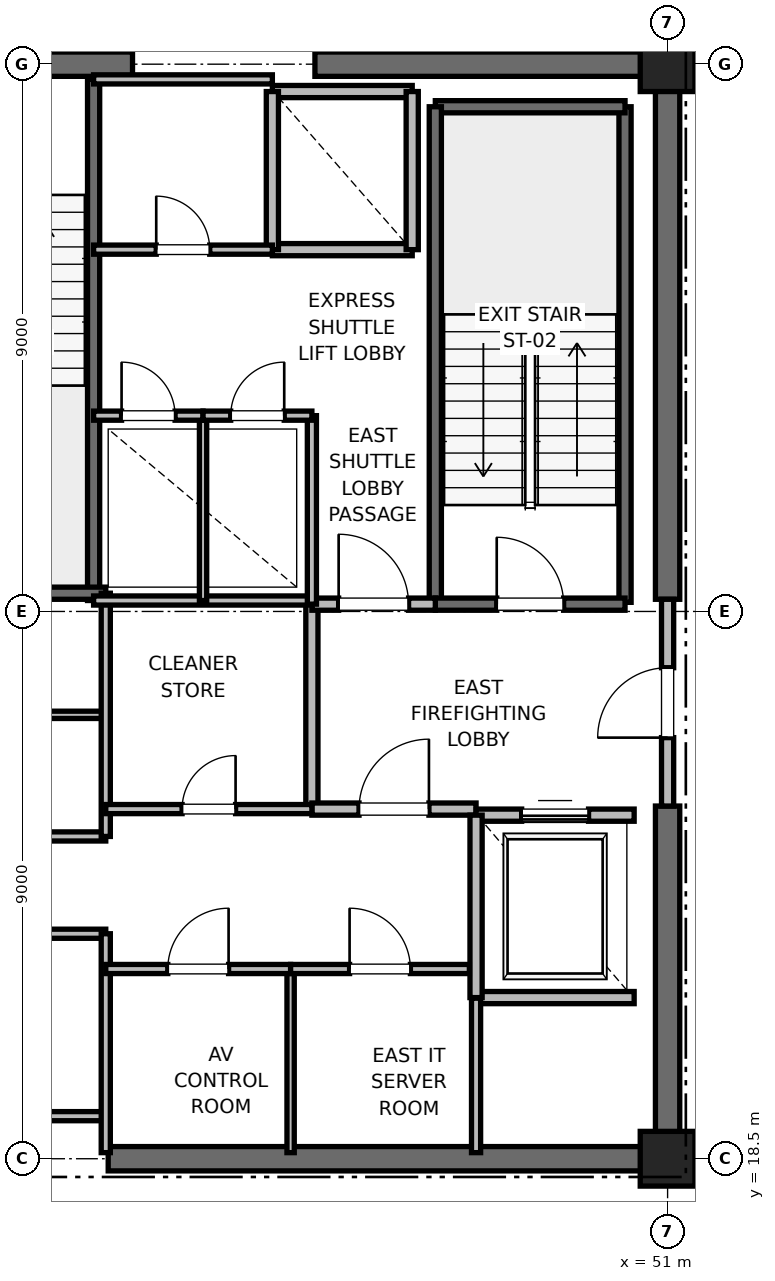
"""IFC4 building model, lengths in metres.
Left out: names, types, materials, properties, quantities, classifications, styles, units other than length and angle.
Written with IfcOpenShell. Run it as: python <this file> out.ifc"""

import sys

from ifc_helpers import new_model, si_unit, direction, frame, frame_2d, origin, origin_2d, place, context, subcontext, project, spatial, rectangle, extrude, element, fill, save


model = new_model("IFC4")
c1 = context("Model", 3, precision=1e-05, world=origin(), true_north=direction((0.0, 1.0)))
c2 = subcontext(c1, "Body", "Model", "MODEL_VIEW")
j1 = project(units=[si_unit("LENGTHUNIT", "METRE"), si_unit("PLANEANGLEUNIT", "RADIAN")], contexts=[c1])
p1 = place(None, origin())
s1 = spatial("IfcSite", under=j1, at=p1, CompositionType="ELEMENT")
p2 = place(p1, origin())
s2 = spatial("IfcBuilding", under=s1, at=p2, CompositionType="ELEMENT")
p3 = place(p2, frame((0.0, 0.0, 314.8)))
s3 = spatial("IfcBuildingStorey", under=s2, at=p3, CompositionType="ELEMENT", Elevation=314.8)
for number, where, z_axis, x_axis in (
    (1, (51.0, 18.5, 0.0), (0.0, 0.0, 1.0), (1.0, 0.0, 0.0)),
    (2, (51.0, 36.5, 0.0), (0.0, 0.0, 1.0), (1.0, 0.0, 0.0)),
):
    element("IfcColumn", number, at=place(p3, frame(where, z_axis=z_axis, x_axis=x_axis)), inside=s3, PredefinedType="PILASTER", context=c2, shape_type="SweptSolid", body=[
        extrude(rectangle(XDim=0.9, YDim=0.9, at=origin_2d()), origin(), (0.0, 0.0, 1.0), 4.0),
    ])
p4 = place(p3, frame((41.8, 18.5, 0.0), z_axis=(0.0, 0.0, 1.0), x_axis=(1.0, 0.0, 0.0)))
e3 = element("IfcWall", 3, at=p4, inside=s3, PredefinedType="SHEAR", context=c2, shape_type="SweptSolid", body=[
    extrude(rectangle(XDim=9.2, YDim=0.4, at=frame_2d((4.6, 0.0))), origin(), (0.0, 0.0, 1.0), 3.785),
])
p5 = place(p3, frame((37.8, 36.5, 0.0), z_axis=(0.0, 0.0, 1.0), x_axis=(1.0, 0.0, 0.0)))
e4 = element("IfcWall", 4, at=p5, inside=s3, PredefinedType="SHEAR", context=c2, shape_type="SweptSolid", body=[
    extrude(rectangle(XDim=4.4, YDim=0.4, at=frame_2d((2.2, 0.0))), origin(), (0.0, 0.0, 1.0), 3.785),
])
p6 = place(p5, frame((1.65, 0.0, 0.0)))
e5 = element("IfcOpeningElement", 5, at=p6, cuts=e4, PredefinedType="OPENING", context=c2, shape_type="SweptSolid", body=[
    extrude(rectangle(XDim=1.1, YDim=2.15, at=frame_2d((0.55, 1.075))), frame((0.0, 0.2, 0.0), z_axis=(0.0, -1.0, 0.0), x_axis=(1.0, 0.0, 0.0)), (0.0, 0.0, 1.0), 0.4),
])
for number, where, z_axis, x_axis in (
    (6, (45.2, 36.5, 0.0), (0.0, 0.0, 1.0), (1.0, 0.0, 0.0)),
    (7, (51.0, 18.5, 0.0), (0.0, 0.0, 1.0), (0.0, 1.0, 0.0)),
):
    element("IfcWall", number, at=place(p3, frame(where, z_axis=z_axis, x_axis=x_axis)), inside=s3, PredefinedType="SHEAR", context=c2, shape_type="SweptSolid", body=[
        extrude(rectangle(XDim=5.8, YDim=0.4, at=frame_2d((2.9, 0.0))), origin(), (0.0, 0.0, 1.0), 3.785),
    ])
p7 = place(p3, frame((51.0, 27.7, 0.0), z_axis=(0.0, 0.0, 1.0), x_axis=(0.0, 1.0, 0.0)))
e8 = element("IfcWall", 8, at=p7, inside=s3, PredefinedType="SHEAR", context=c2, shape_type="SweptSolid", body=[
    extrude(rectangle(XDim=8.8, YDim=0.4, at=frame_2d((4.4, 0.0))), origin(), (0.0, 0.0, 1.0), 3.785),
])
p8 = place(p3, frame((50.3, 27.65, 0.0), z_axis=(0.0, 0.0, 1.0), x_axis=(0.0, 1.0, 0.0)))
e9 = element("IfcWall", 9, at=p8, inside=s3, PredefinedType="SOLIDWALL", context=c2, shape_type="SweptSolid", body=[
    extrude(rectangle(XDim=8.15, YDim=0.2, at=frame_2d((4.075, 0.0))), origin(), (0.0, 0.0, 1.0), 3.785),
])
p9 = place(p3, frame((47.18, 35.8, 0.0), z_axis=(0.0, 0.0, 1.0), x_axis=(1.0, 0.0, 0.0)))
e10 = element("IfcWall", 10, at=p9, inside=s3, PredefinedType="SOLIDWALL", context=c2, shape_type="SweptSolid", body=[
    extrude(rectangle(XDim=3.12, YDim=0.2, at=frame_2d((1.56, 0.0))), origin(), (0.0, 0.0, 1.0), 3.785),
])
p10 = place(p3, frame((47.18, 27.62, 0.0), z_axis=(0.0, 0.0, 1.0), x_axis=(0.0, 1.0, 0.0)))
e11 = element("IfcWall", 11, at=p10, inside=s3, PredefinedType="SOLIDWALL", context=c2, shape_type="SweptSolid", body=[
    extrude(rectangle(XDim=8.18, YDim=0.2, at=frame_2d((4.09, 0.0))), origin(), (0.0, 0.0, 1.0), 3.785),
])
p11 = place(p3, frame((47.18, 27.62, 0.0), z_axis=(0.0, 0.0, 1.0), x_axis=(1.0, 0.0, 0.0)))
e12 = element("IfcWall", 12, at=p11, inside=s3, PredefinedType="SOLIDWALL", context=c2, shape_type="SweptSolid", body=[
    extrude(rectangle(XDim=3.12, YDim=0.2, at=frame_2d((1.56, 0.0))), origin(), (0.0, 0.0, 1.0), 3.785),
])
p12 = place(p11, frame((1.01, 0.0, 0.0)))
e13 = element("IfcOpeningElement", 13, at=p12, cuts=e12, PredefinedType="OPENING", context=c2, shape_type="SweptSolid", body=[
    extrude(rectangle(XDim=1.1, YDim=2.15, at=frame_2d((0.55, 1.075))), frame((0.0, 0.1, 0.0), z_axis=(0.0, -1.0, 0.0), x_axis=(1.0, 0.0, 0.0)), (0.0, 0.0, 1.0), 0.2),
])
p13 = place(p3, frame((41.56, 27.68, 0.0), z_axis=(0.0, 0.0, 1.0), x_axis=(0.0, 1.0, 0.0)))
e14 = element("IfcWall", 14, at=p13, inside=s3, PredefinedType="SOLIDWALL", context=c2, shape_type="SweptSolid", body=[
    extrude(rectangle(XDim=8.57, YDim=0.2, at=frame_2d((4.285, 0.0))), origin(), (0.0, 0.0, 1.0), 3.785),
])
p14 = place(p3, frame((38.44, 27.8, 0.0), z_axis=(0.0, 0.0, 1.0), x_axis=(1.0, 0.0, 0.0)))
e15 = element("IfcWall", 15, at=p14, inside=s3, PredefinedType="SOLIDWALL", context=c2, shape_type="SweptSolid", body=[
    extrude(rectangle(XDim=3.32, YDim=0.2, at=frame_2d((1.66, 0.0))), origin(), (0.0, 0.0, 1.0), 3.785),
])
p15 = place(p3, frame((45.15, 24.25, 0.0), z_axis=(0.0, 0.0, 1.0), x_axis=(0.0, 1.0, 0.0)))
e16 = element("IfcWall", 16, at=p15, inside=s3, PredefinedType="PARTITIONING", context=c2, shape_type="SweptSolid", body=[
    extrude(rectangle(XDim=3.37, YDim=0.2, at=frame_2d((1.685, 0.0))), origin(), (0.0, 0.0, 1.0), 3.785),
])
p16 = place(p3, frame((45.15, 24.25, 0.0), z_axis=(0.0, 0.0, 1.0), x_axis=(1.0, 0.0, 0.0)))
e17 = element("IfcWall", 17, at=p16, inside=s3, PredefinedType="PARTITIONING", context=c2, shape_type="SweptSolid", body=[
    extrude(rectangle(XDim=2.7, YDim=0.2, at=frame_2d((1.35, 0.0))), origin(), (0.0, 0.0, 1.0), 3.785),
])
p17 = place(p16, frame((0.775, 0.0, 0.0)))
e18 = element("IfcOpeningElement", 18, at=p17, cuts=e17, PredefinedType="OPENING", context=c2, shape_type="SweptSolid", body=[
    extrude(rectangle(XDim=1.15, YDim=2.2, at=frame_2d((0.575, 1.1))), frame((0.0, 0.1, 0.0), z_axis=(0.0, -1.0, 0.0), x_axis=(1.0, 0.0, 0.0)), (0.0, 0.0, 1.0), 0.2),
])
p18 = place(p3, frame((45.15, 27.62, 0.0), z_axis=(0.0, 0.0, 1.0), x_axis=(1.0, 0.0, 0.0)))
e19 = element("IfcWall", 19, at=p18, inside=s3, PredefinedType="PARTITIONING", context=c2, shape_type="SweptSolid", body=[
    extrude(rectangle(XDim=2.03, YDim=0.2, at=frame_2d((1.015, 0.0))), origin(), (0.0, 0.0, 1.0), 3.785),
])
p19 = place(p18, frame((0.44, 0.0, 0.0)))
e20 = element("IfcOpeningElement", 20, at=p19, cuts=e19, PredefinedType="OPENING", context=c2, shape_type="SweptSolid", body=[
    extrude(rectangle(XDim=1.15, YDim=2.2, at=frame_2d((0.575, 1.1))), frame((0.0, 0.1, 0.0), z_axis=(0.0, -1.0, 0.0), x_axis=(1.0, 0.0, 0.0)), (0.0, 0.0, 1.0), 0.2),
])
p20 = place(p3, frame((51.0, 24.3, 0.0), z_axis=(0.0, 0.0, 1.0), x_axis=(0.0, 1.0, 0.0)))
e21 = element("IfcWall", 21, at=p20, inside=s3, PredefinedType="PARTITIONING", context=c2, shape_type="SweptSolid", body=[
    extrude(rectangle(XDim=3.4, YDim=0.2, at=frame_2d((1.7, 0.0))), origin(), (0.0, 0.0, 1.0), 2.865),
])
p21 = place(p20, frame((1.125, 0.0, 0.0)))
e22 = element("IfcOpeningElement", 22, at=p21, cuts=e21, PredefinedType="OPENING", context=c2, shape_type="SweptSolid", body=[
    extrude(rectangle(XDim=1.15, YDim=2.2, at=frame_2d((0.575, 1.1))), frame((0.0, 0.1, 0.0), z_axis=(0.0, -1.0, 0.0), x_axis=(1.0, 0.0, 0.0)), (0.0, 0.0, 1.0), 0.2),
])
p22 = place(p3, frame((47.85, 21.15, 0.0), z_axis=(0.0, 0.0, 1.0), x_axis=(1.0, 0.0, 0.0)))
e23 = element("IfcWall", 23, at=p22, inside=s3, PredefinedType="SOLIDWALL", context=c2, shape_type="SweptSolid", body=[
    extrude(rectangle(XDim=2.6, YDim=0.2, at=frame_2d((1.3, 0.0))), origin(), (0.0, 0.0, 1.0), 3.785),
])
p23 = place(p3, frame((50.45, 24.15, 0.0), z_axis=(0.0, 0.0, 1.0), x_axis=(-1.0, 0.0, 0.0)))
e24 = element("IfcWall", 24, at=p23, inside=s3, PredefinedType="SOLIDWALL", context=c2, shape_type="SweptSolid", body=[
    extrude(rectangle(XDim=2.6, YDim=0.2, at=frame_2d((1.3, 0.0))), origin(), (0.0, 0.0, 1.0), 2.865),
])
p24 = place(p23, frame((0.75, 0.0, 0.0)))
e25 = element("IfcOpeningElement", 25, at=p24, cuts=e24, PredefinedType="OPENING", context=c2, shape_type="SweptSolid", body=[
    extrude(rectangle(XDim=1.1, YDim=2.2, at=frame_2d((0.55, 1.1))), frame((0.0, 0.1, 0.0), z_axis=(0.0, -1.0, 0.0), x_axis=(1.0, 0.0, 0.0)), (0.0, 0.0, 1.0), 0.2),
])
p25 = place(p3, frame((47.85, 24.15, 0.0), z_axis=(0.0, 0.0, 1.0), x_axis=(0.0, -1.0, 0.0)))
e26 = element("IfcWall", 26, at=p25, inside=s3, PredefinedType="SOLIDWALL", context=c2, shape_type="SweptSolid", body=[
    extrude(rectangle(XDim=3.0, YDim=0.2, at=frame_2d((1.5, 0.0))), origin(), (0.0, 0.0, 1.0), 3.785),
])
p26 = place(p3, frame((44.5, 33.45, 0.0), z_axis=(0.0, 0.0, 1.0), x_axis=(1.0, 0.0, 0.0)))
e27 = element("IfcWall", 27, at=p26, inside=s3, PredefinedType="SOLIDWALL", context=c2, shape_type="SweptSolid", body=[
    extrude(rectangle(XDim=2.3, YDim=0.2, at=frame_2d((1.15, 0.0))), origin(), (0.0, 0.0, 1.0), 3.785),
])
p27 = place(p3, frame((46.8, 36.05, 0.0), z_axis=(0.0, 0.0, 1.0), x_axis=(-1.0, 0.0, 0.0)))
e28 = element("IfcWall", 28, at=p27, inside=s3, PredefinedType="SOLIDWALL", context=c2, shape_type="SweptSolid", body=[
    extrude(rectangle(XDim=2.3, YDim=0.2, at=frame_2d((1.15, 0.0))), origin(), (0.0, 0.0, 1.0), 2.865),
])
p28 = place(p3, frame((44.5, 36.05, 0.0), z_axis=(0.0, 0.0, 1.0), x_axis=(0.0, -1.0, 0.0)))
e29 = element("IfcWall", 29, at=p28, inside=s3, PredefinedType="SOLIDWALL", context=c2, shape_type="SweptSolid", body=[
    extrude(rectangle(XDim=2.6, YDim=0.2, at=frame_2d((1.3, 0.0))), origin(), (0.0, 0.0, 1.0), 2.865),
])
p29 = place(p3, frame((46.8, 33.45, 0.0), z_axis=(0.0, 0.0, 1.0), x_axis=(0.0, 1.0, 0.0)))
e30 = element("IfcWall", 30, at=p29, inside=s3, PredefinedType="SOLIDWALL", context=c2, shape_type="SweptSolid", body=[
    extrude(rectangle(XDim=2.6, YDim=0.2, at=frame_2d((1.3, 0.0))), origin(), (0.0, 0.0, 1.0), 3.785),
])
for number, where, z_axis, x_axis in (
    (31, (39.95, 19.2, 0.0), (0.0, 0.0, 1.0), (1.0, 0.0, 0.0)),
    (32, (39.95, 22.2, 0.0), (0.0, 0.0, 1.0), (1.0, 0.0, 0.0)),
    (33, (39.95, 23.8, 0.0), (0.0, 0.0, 1.0), (1.0, 0.0, 0.0)),
):
    element("IfcWall", number, at=place(p3, frame(where, z_axis=z_axis, x_axis=x_axis)), inside=s3, PredefinedType="PARTITIONING", context=c2, shape_type="SweptSolid", body=[
        extrude(rectangle(XDim=1.81, YDim=0.15, at=frame_2d((0.905, 0.0))), origin(), (0.0, 0.0, 1.0), 2.85),
    ])
p30 = place(p3, frame((39.95, 25.8, 0.0), z_axis=(0.0, 0.0, 1.0), x_axis=(1.0, 0.0, 0.0)))
e34 = element("IfcWall", 34, at=p30, inside=s3, PredefinedType="PARTITIONING", context=c2, shape_type="SweptSolid", body=[
    extrude(rectangle(XDim=1.81, YDim=0.12, at=frame_2d((0.905, 0.0))), origin(), (0.0, 0.0, 1.0), 2.85),
])
p31 = place(p3, frame((41.76, 18.6, 0.0), z_axis=(0.0, 0.0, 1.0), x_axis=(0.0, 1.0, 0.0)))
e35 = element("IfcWall", 35, at=p31, inside=s3, PredefinedType="PARTITIONING", context=c2, shape_type="SweptSolid", body=[
    extrude(rectangle(XDim=3.6, YDim=0.15, at=frame_2d((1.8, 0.0))), origin(), (0.0, 0.0, 1.0), 2.85),
])
p32 = place(p3, frame((41.76, 23.8, 0.0), z_axis=(0.0, 0.0, 1.0), x_axis=(0.0, 1.0, 0.0)))
e36 = element("IfcWall", 36, at=p32, inside=s3, PredefinedType="PARTITIONING", context=c2, shape_type="SweptSolid", body=[
    extrude(rectangle(XDim=4.0, YDim=0.15, at=frame_2d((2.0, 0.0))), origin(), (0.0, 0.0, 1.0), 2.85),
])
p33 = place(p3, frame((41.56, 27.68, 0.0), z_axis=(0.0, 0.0, 1.0), x_axis=(1.0, 0.0, 0.0)))
e37 = element("IfcWall", 37, at=p33, inside=s3, PredefinedType="PARTITIONING", context=c2, shape_type="SweptSolid", body=[
    extrude(rectangle(XDim=3.59, YDim=0.15, at=frame_2d((1.795, 0.0))), origin(), (0.0, 0.0, 1.0), 2.85),
])
p34 = place(p3, frame((47.85, 18.6, 0.0), z_axis=(0.0, 0.0, 1.0), x_axis=(0.0, 1.0, 0.0)))
e38 = element("IfcWall", 38, at=p34, inside=s3, PredefinedType="PARTITIONING", context=c2, shape_type="SweptSolid", body=[
    extrude(rectangle(XDim=2.54, YDim=0.15, at=frame_2d((1.27, 0.0))), origin(), (0.0, 0.0, 1.0), 2.85),
])
p35 = place(p3, frame((44.8, 18.6, 0.0), z_axis=(0.0, 0.0, 1.0), x_axis=(0.0, 1.0, 0.0)))
e39 = element("IfcWall", 39, at=p35, inside=s3, PredefinedType="PARTITIONING", context=c2, shape_type="SweptSolid", body=[
    extrude(rectangle(XDim=3.02, YDim=0.12, at=frame_2d((1.51, 0.0))), origin(), (0.0, 0.0, 1.0), 2.85),
])
p36 = place(p3, frame((41.76, 21.62, 0.0), z_axis=(0.0, 0.0, 1.0), x_axis=(1.0, 0.0, 0.0)))
e40 = element("IfcWall", 40, at=p36, inside=s3, PredefinedType="PARTITIONING", context=c2, shape_type="SweptSolid", body=[
    extrude(rectangle(XDim=3.04, YDim=0.15, at=frame_2d((1.52, 0.0))), origin(), (0.0, 0.0, 1.0), 2.85),
])
p37 = place(p36, frame((1.02, 0.0, 0.0)))
e41 = element("IfcOpeningElement", 41, at=p37, cuts=e40, PredefinedType="OPENING", context=c2, shape_type="SweptSolid", body=[
    extrude(rectangle(XDim=1.0, YDim=2.15, at=frame_2d((0.5, 1.075))), frame((0.0, 0.075, 0.0), z_axis=(0.0, -1.0, 0.0), x_axis=(1.0, 0.0, 0.0)), (0.0, 0.0, 1.0), 0.15),
])
p38 = place(p3, frame((44.8, 21.62, 0.0), z_axis=(0.0, 0.0, 1.0), x_axis=(1.0, 0.0, 0.0)))
e42 = element("IfcWall", 42, at=p38, inside=s3, PredefinedType="PARTITIONING", context=c2, shape_type="SweptSolid", body=[
    extrude(rectangle(XDim=2.94, YDim=0.15, at=frame_2d((1.47, 0.0))), origin(), (0.0, 0.0, 1.0), 2.85),
])
p39 = place(p38, frame((0.97, 0.0, 0.0)))
e43 = element("IfcOpeningElement", 43, at=p39, cuts=e42, PredefinedType="OPENING", context=c2, shape_type="SweptSolid", body=[
    extrude(rectangle(XDim=1.0, YDim=2.15, at=frame_2d((0.5, 1.075))), frame((0.0, 0.075, 0.0), z_axis=(0.0, -1.0, 0.0), x_axis=(1.0, 0.0, 0.0)), (0.0, 0.0, 1.0), 0.15),
])
p40 = place(p3, frame((41.76, 24.25, 0.0), z_axis=(0.0, 0.0, 1.0), x_axis=(1.0, 0.0, 0.0)))
e44 = element("IfcWall", 44, at=p40, inside=s3, PredefinedType="PARTITIONING", context=c2, shape_type="SweptSolid", body=[
    extrude(rectangle(XDim=3.39, YDim=0.15, at=frame_2d((1.695, 0.0))), origin(), (0.0, 0.0, 1.0), 2.85),
])
p41 = place(p40, frame((1.255, 0.0, 0.0)))
e45 = element("IfcOpeningElement", 45, at=p41, cuts=e44, PredefinedType="OPENING", context=c2, shape_type="SweptSolid", body=[
    extrude(rectangle(XDim=0.88, YDim=2.1, at=frame_2d((0.44, 1.05))), frame((0.0, 0.075, 0.0), z_axis=(0.0, -1.0, 0.0), x_axis=(1.0, 0.0, 0.0)), (0.0, 0.0, 1.0), 0.15),
])
p42 = place(p3, frame((45.15, 27.62, 0.0), z_axis=(0.0, 0.0, 1.0), x_axis=(0.0, 1.0, 0.0)))
e46 = element("IfcWall", 46, at=p42, inside=s3, PredefinedType="PARTITIONING", context=c2, shape_type="SweptSolid", body=[
    extrude(rectangle(XDim=3.1, YDim=0.15, at=frame_2d((1.55, 0.0))), origin(), (0.0, 0.0, 1.0), 2.85),
])
p43 = place(p3, frame((43.36, 27.68, 0.0), z_axis=(0.0, 0.0, 1.0), x_axis=(0.0, 1.0, 0.0)))
e47 = element("IfcWall", 47, at=p43, inside=s3, PredefinedType="PARTITIONING", context=c2, shape_type="SweptSolid", body=[
    extrude(rectangle(XDim=3.04, YDim=0.12, at=frame_2d((1.52, 0.0))), origin(), (0.0, 0.0, 1.0), 2.85),
])
p44 = place(p3, frame((41.56, 30.72, 0.0), z_axis=(0.0, 0.0, 1.0), x_axis=(1.0, 0.0, 0.0)))
e48 = element("IfcWall", 48, at=p44, inside=s3, PredefinedType="PARTITIONING", context=c2, shape_type="SweptSolid", body=[
    extrude(rectangle(XDim=1.8, YDim=0.15, at=frame_2d((0.9, 0.0))), origin(), (0.0, 0.0, 1.0), 2.85),
])
p45 = place(p44, frame((0.46, 0.0, 0.0)))
e49 = element("IfcOpeningElement", 49, at=p45, cuts=e48, PredefinedType="OPENING", context=c2, shape_type="SweptSolid", body=[
    extrude(rectangle(XDim=0.88, YDim=2.1, at=frame_2d((0.44, 1.05))), frame((0.0, 0.075, 0.0), z_axis=(0.0, -1.0, 0.0), x_axis=(1.0, 0.0, 0.0)), (0.0, 0.0, 1.0), 0.15),
])
p46 = place(p3, frame((43.36, 30.72, 0.0), z_axis=(0.0, 0.0, 1.0), x_axis=(1.0, 0.0, 0.0)))
e50 = element("IfcWall", 50, at=p46, inside=s3, PredefinedType="PARTITIONING", context=c2, shape_type="SweptSolid", body=[
    extrude(rectangle(XDim=1.79, YDim=0.15, at=frame_2d((0.895, 0.0))), origin(), (0.0, 0.0, 1.0), 2.85),
])
p47 = place(p46, frame((0.455, 0.0, 0.0)))
e51 = element("IfcOpeningElement", 51, at=p47, cuts=e50, PredefinedType="OPENING", context=c2, shape_type="SweptSolid", body=[
    extrude(rectangle(XDim=0.88, YDim=2.1, at=frame_2d((0.44, 1.05))), frame((0.0, 0.075, 0.0), z_axis=(0.0, -1.0, 0.0), x_axis=(1.0, 0.0, 0.0)), (0.0, 0.0, 1.0), 0.15),
])
p48 = place(p3, frame((41.56, 36.25, 0.0), z_axis=(0.0, 0.0, 1.0), x_axis=(1.0, 0.0, 0.0)))
e52 = element("IfcWall", 52, at=p48, inside=s3, PredefinedType="PARTITIONING", context=c2, shape_type="SweptSolid", body=[
    extrude(rectangle(XDim=2.94, YDim=0.15, at=frame_2d((1.47, 0.0))), origin(), (0.0, 0.0, 1.0), 2.85),
])
p49 = place(p3, frame((41.56, 33.45, 0.0), z_axis=(0.0, 0.0, 1.0), x_axis=(1.0, 0.0, 0.0)))
e53 = element("IfcWall", 53, at=p49, inside=s3, PredefinedType="PARTITIONING", context=c2, shape_type="SweptSolid", body=[
    extrude(rectangle(XDim=2.94, YDim=0.15, at=frame_2d((1.47, 0.0))), origin(), (0.0, 0.0, 1.0), 2.85),
])
p50 = place(p49, frame((1.03, 0.0, 0.0)))
e54 = element("IfcOpeningElement", 54, at=p50, cuts=e53, PredefinedType="OPENING", context=c2, shape_type="SweptSolid", body=[
    extrude(rectangle(XDim=0.88, YDim=2.1, at=frame_2d((0.44, 1.05))), frame((0.0, 0.075, 0.0), z_axis=(0.0, -1.0, 0.0), x_axis=(1.0, 0.0, 0.0)), (0.0, 0.0, 1.0), 0.15),
])
p51 = place(p12, origin())
e55 = element("IfcDoor", 55, at=p51, inside=s3, OperationType="SINGLE_SWING_LEFT", PredefinedType="DOOR", context=c2, shape_type="SweptSolid", body=[
    extrude(rectangle(XDim=1.1, YDim=2.15, at=frame_2d((0.55, 1.075))), frame((0.0, 0.025, 0.0), z_axis=(0.0, -1.0, 0.0), x_axis=(1.0, 0.0, 0.0)), (0.0, 0.0, 1.0), 0.05),
])
fill(e13, e55)
p52 = place(p17, origin())
e56 = element("IfcDoor", 56, at=p52, inside=s3, OperationType="SINGLE_SWING_RIGHT", PredefinedType="DOOR", context=c2, shape_type="SweptSolid", body=[
    extrude(rectangle(XDim=1.15, YDim=2.2, at=frame_2d((0.575, 1.1))), frame((0.0, 0.025, 0.0), z_axis=(0.0, -1.0, 0.0), x_axis=(1.0, 0.0, 0.0)), (0.0, 0.0, 1.0), 0.05),
])
fill(e18, e56)
p53 = place(p19, origin())
e57 = element("IfcDoor", 57, at=p53, inside=s3, OperationType="SINGLE_SWING_LEFT", PredefinedType="DOOR", context=c2, shape_type="SweptSolid", body=[
    extrude(rectangle(XDim=1.15, YDim=2.2, at=frame_2d((0.575, 1.1))), frame((0.0, 0.025, 0.0), z_axis=(0.0, -1.0, 0.0), x_axis=(1.0, 0.0, 0.0)), (0.0, 0.0, 1.0), 0.05),
])
fill(e20, e57)
p54 = place(p21, origin())
e58 = element("IfcDoor", 58, at=p54, inside=s3, OperationType="SINGLE_SWING_LEFT", PredefinedType="DOOR", context=c2, shape_type="SweptSolid", body=[
    extrude(rectangle(XDim=1.15, YDim=2.2, at=frame_2d((0.575, 1.1))), frame((0.0, 0.025, 0.0), z_axis=(0.0, -1.0, 0.0), x_axis=(1.0, 0.0, 0.0)), (0.0, 0.0, 1.0), 0.05),
])
fill(e22, e58)
p55 = place(p24, origin())
e59 = element("IfcDoor", 59, at=p55, inside=s3, OperationType="SLIDING_TO_RIGHT", PredefinedType="DOOR", context=c2, shape_type="SweptSolid", body=[
    extrude(rectangle(XDim=1.1, YDim=2.2, at=frame_2d((0.55, 1.1))), frame((0.0, 0.025, 0.0), z_axis=(0.0, -1.0, 0.0), x_axis=(1.0, 0.0, 0.0)), (0.0, 0.0, 1.0), 0.05),
])
fill(e25, e59)
p56 = place(p37, origin())
e60 = element("IfcDoor", 60, at=p56, inside=s3, OperationType="SINGLE_SWING_RIGHT", PredefinedType="DOOR", context=c2, shape_type="SweptSolid", body=[
    extrude(rectangle(XDim=1.0, YDim=2.15, at=frame_2d((0.5, 1.075))), frame((0.0, 0.025, 0.0), z_axis=(0.0, -1.0, 0.0), x_axis=(1.0, 0.0, 0.0)), (0.0, 0.0, 1.0), 0.05),
])
fill(e41, e60)
p57 = place(p39, origin())
e61 = element("IfcDoor", 61, at=p57, inside=s3, OperationType="SINGLE_SWING_LEFT", PredefinedType="DOOR", context=c2, shape_type="SweptSolid", body=[
    extrude(rectangle(XDim=1.0, YDim=2.15, at=frame_2d((0.5, 1.075))), frame((0.0, 0.025, 0.0), z_axis=(0.0, -1.0, 0.0), x_axis=(1.0, 0.0, 0.0)), (0.0, 0.0, 1.0), 0.05),
])
fill(e43, e61)
p58 = place(p41, origin())
e62 = element("IfcDoor", 62, at=p58, inside=s3, OperationType="SINGLE_SWING_RIGHT", PredefinedType="DOOR", context=c2, shape_type="SweptSolid", body=[
    extrude(rectangle(XDim=0.88, YDim=2.1, at=frame_2d((0.44, 1.05))), frame((0.0, 0.025, 0.0), z_axis=(0.0, -1.0, 0.0), x_axis=(1.0, 0.0, 0.0)), (0.0, 0.0, 1.0), 0.05),
])
fill(e45, e62)
p59 = place(p45, origin())
e63 = element("IfcDoor", 63, at=p59, inside=s3, OperationType="SINGLE_SWING_LEFT", PredefinedType="DOOR", context=c2, shape_type="SweptSolid", body=[
    extrude(rectangle(XDim=0.88, YDim=2.1, at=frame_2d((0.44, 1.05))), frame((0.0, 0.025, 0.0), z_axis=(0.0, -1.0, 0.0), x_axis=(1.0, 0.0, 0.0)), (0.0, 0.0, 1.0), 0.05),
])
fill(e49, e63)
p60 = place(p47, origin())
e64 = element("IfcDoor", 64, at=p60, inside=s3, OperationType="SINGLE_SWING_RIGHT", PredefinedType="DOOR", context=c2, shape_type="SweptSolid", body=[
    extrude(rectangle(XDim=0.88, YDim=2.1, at=frame_2d((0.44, 1.05))), frame((0.0, 0.025, 0.0), z_axis=(0.0, -1.0, 0.0), x_axis=(1.0, 0.0, 0.0)), (0.0, 0.0, 1.0), 0.05),
])
fill(e51, e64)
p61 = place(p50, origin())
e65 = element("IfcDoor", 65, at=p61, inside=s3, OperationType="SINGLE_SWING_LEFT", PredefinedType="DOOR", context=c2, shape_type="SweptSolid", body=[
    extrude(rectangle(XDim=0.88, YDim=2.1, at=frame_2d((0.44, 1.05))), frame((0.0, 0.025, 0.0), z_axis=(0.0, -1.0, 0.0), x_axis=(1.0, 0.0, 0.0)), (0.0, 0.0, 1.0), 0.05),
])
fill(e54, e65)
save(model, sys.argv[1])
